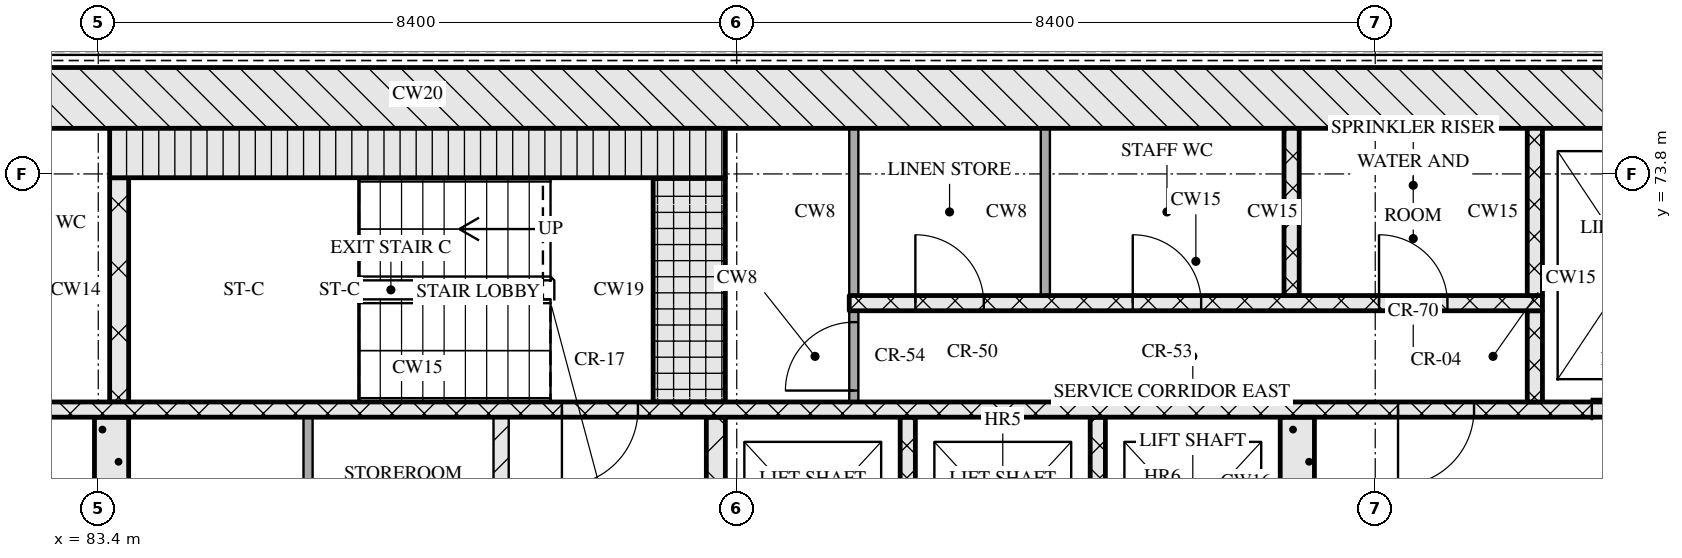
"""IFC4 building model, lengths in metres.
Left out: names, types, materials, properties, quantities, classifications, styles, units other than length and angle.
Written with IfcOpenShell. Run it as: python <this file> out.ifc"""

import sys

from ifc_helpers import new_model, si_unit, direction, frame, frame_2d, origin, place, context, subcontext, project, spatial, rectangle, extrude, element, fill, save


model = new_model("IFC4")
c1 = context("Model", 3, precision=1e-05, world=origin(), true_north=direction((0.0, 1.0)))
c2 = subcontext(c1, "Body", "Model", "MODEL_VIEW")
j1 = project(units=[si_unit("LENGTHUNIT", "METRE"), si_unit("PLANEANGLEUNIT", "RADIAN")], contexts=[c1])
p1 = place(None, origin())
s1 = spatial("IfcSite", under=j1, at=p1, CompositionType="ELEMENT")
p2 = place(p1, origin())
s2 = spatial("IfcBuilding", under=s1, at=p2, CompositionType="ELEMENT")
p3 = place(p2, frame((0.0, 0.0, 154.65)))
s3 = spatial("IfcBuildingStorey", under=s2, at=p3, CompositionType="ELEMENT", Elevation=154.65)
p4 = place(p3, frame((67.0, 74.8, 0.0), z_axis=(0.0, 0.0, 1.0), x_axis=(1.0, 0.0, 0.0)))
e1 = element("IfcWall", 1, at=p4, inside=s3, PredefinedType="SOLIDWALL", context=c2, shape_type="SweptSolid", body=[
    extrude(rectangle(XDim=41.2, YDim=0.8, at=frame_2d((20.6, 0.0))), origin(), (0.0, 0.0, 1.0), 3.32),
])
p5 = place(p3, frame((83.575, 68.0, 0.0), z_axis=(0.0, 0.0, 1.0), x_axis=(0.0, 1.0, 0.0)))
e2 = element("IfcWall", 2, at=p5, inside=s3, PredefinedType="SOLIDWALL", context=c2, shape_type="SweptSolid", body=[
    extrude(rectangle(XDim=2.6, YDim=0.45, at=frame_2d((1.3, 0.0))), origin(), (0.0, 0.0, 1.0), 3.32),
])
p6 = place(p3, frame((86.16, 68.0, 0.0), z_axis=(0.0, 0.0, 1.0), x_axis=(0.0, 1.0, 0.0)))
e3 = element("IfcWall", 3, at=p6, inside=s3, PredefinedType="PARTITIONING", context=c2, shape_type="SweptSolid", body=[
    extrude(rectangle(XDim=2.6, YDim=0.12, at=frame_2d((1.3, 0.0))), origin(), (0.0, 0.0, 1.0), 3.32),
])
p7 = place(p3, frame((88.7, 68.0, 0.0), z_axis=(0.0, 0.0, 1.0), x_axis=(0.0, 1.0, 0.0)))
e4 = element("IfcWall", 4, at=p7, inside=s3, PredefinedType="PARTITIONING", context=c2, shape_type="SweptSolid", body=[
    extrude(rectangle(XDim=2.6, YDim=0.2, at=frame_2d((1.3, 0.0))), origin(), (0.0, 0.0, 1.0), 3.32),
])
p8 = place(p3, frame((91.525, 68.0, 0.0), z_axis=(0.0, 0.0, 1.0), x_axis=(0.0, 1.0, 0.0)))
e5 = element("IfcWall", 5, at=p8, inside=s3, PredefinedType="SOLIDWALL", context=c2, shape_type="SweptSolid", body=[
    extrude(rectangle(XDim=2.6, YDim=0.25, at=frame_2d((1.3, 0.0))), origin(), (0.0, 0.0, 1.0), 3.32),
])
for number, where, z_axis, x_axis in (
    (6, (94.05, 68.0, 0.0), (0.0, 0.0, 1.0), (0.0, 1.0, 0.0)),
    (7, (96.55, 68.0, 0.0), (0.0, 0.0, 1.0), (0.0, 1.0, 0.0)),
):
    element("IfcWall", number, at=place(p3, frame(where, z_axis=z_axis, x_axis=x_axis)), inside=s3, PredefinedType="SOLIDWALL", context=c2, shape_type="SweptSolid", body=[
        extrude(rectangle(XDim=2.6, YDim=0.2, at=frame_2d((1.3, 0.0))), origin(), (0.0, 0.0, 1.0), 3.32),
    ])
p9 = place(p3, frame((99.175, 68.3, 0.0), z_axis=(0.0, 0.0, 1.0), x_axis=(0.0, 1.0, 0.0)))
e8 = element("IfcWall", 8, at=p9, inside=s3, PredefinedType="SOLIDWALL", context=c2, shape_type="SweptSolid", body=[
    extrude(rectangle(XDim=2.3, YDim=0.45, at=frame_2d((1.15, 0.0))), origin(), (0.0, 0.0, 1.0), 3.32),
])
p10 = place(p3, frame((67.8, 70.7, 0.0), z_axis=(0.0, 0.0, 1.0), x_axis=(1.0, 0.0, 0.0)))
e9 = element("IfcWall", 9, at=p10, inside=s3, PredefinedType="SOLIDWALL", context=c2, shape_type="SweptSolid", body=[
    extrude(rectangle(XDim=39.6, YDim=0.2, at=frame_2d((19.8, 0.0))), origin(), (0.0, 0.0, 1.0), 3.32),
])
p11 = place(p10, frame((0.65, 0.0, 0.0)))
e10 = element("IfcOpeningElement", 10, at=p11, cuts=e9, PredefinedType="OPENING", context=c2, shape_type="SweptSolid", body=[
    extrude(rectangle(XDim=1.1, YDim=2.1, at=frame_2d((0.55, 1.05))), frame((0.0, 0.11, 0.0), z_axis=(0.0, -1.0, 0.0), x_axis=(1.0, 0.0, 0.0)), (0.0, 0.0, 1.0), 0.22),
])
p12 = place(p10, frame((3.25, 0.0, 0.0)))
e11 = element("IfcOpeningElement", 11, at=p12, cuts=e9, PredefinedType="OPENING", context=c2, shape_type="SweptSolid", body=[
    extrude(rectangle(XDim=1.1, YDim=2.1, at=frame_2d((0.55, 1.05))), frame((0.0, 0.11, 0.0), z_axis=(0.0, -1.0, 0.0), x_axis=(1.0, 0.0, 0.0)), (0.0, 0.0, 1.0), 0.22),
])
p13 = place(p10, frame((5.9, 0.0, 0.0)))
e12 = element("IfcOpeningElement", 12, at=p13, cuts=e9, PredefinedType="OPENING", context=c2, shape_type="SweptSolid", body=[
    extrude(rectangle(XDim=1.0, YDim=2.1, at=frame_2d((0.5, 1.05))), frame((0.0, 0.11, 0.0), z_axis=(0.0, -1.0, 0.0), x_axis=(1.0, 0.0, 0.0)), (0.0, 0.0, 1.0), 0.22),
])
p14 = place(p10, frame((21.7, 0.0, 0.0)))
e13 = element("IfcOpeningElement", 13, at=p14, cuts=e9, PredefinedType="OPENING", context=c2, shape_type="SweptSolid", body=[
    extrude(rectangle(XDim=1.0, YDim=2.1, at=frame_2d((0.5, 1.05))), frame((0.0, 0.11, 0.0), z_axis=(0.0, -1.0, 0.0), x_axis=(1.0, 0.0, 0.0)), (0.0, 0.0, 1.0), 0.22),
])
p15 = place(p10, frame((32.7, 0.0, 0.0)))
e14 = element("IfcOpeningElement", 14, at=p15, cuts=e9, PredefinedType="OPENING", context=c2, shape_type="SweptSolid", body=[
    extrude(rectangle(XDim=1.0, YDim=2.1, at=frame_2d((0.5, 1.05))), frame((0.0, 0.11, 0.0), z_axis=(0.0, -1.0, 0.0), x_axis=(1.0, 0.0, 0.0)), (0.0, 0.0, 1.0), 0.22),
])
p16 = place(p10, frame((35.25, 0.0, 0.0)))
e15 = element("IfcOpeningElement", 15, at=p16, cuts=e9, PredefinedType="OPENING", context=c2, shape_type="SweptSolid", body=[
    extrude(rectangle(XDim=1.1, YDim=2.1, at=frame_2d((0.55, 1.05))), frame((0.0, 0.11, 0.0), z_axis=(0.0, -1.0, 0.0), x_axis=(1.0, 0.0, 0.0)), (0.0, 0.0, 1.0), 0.22),
])
p17 = place(p10, frame((37.85, 0.0, 0.0)))
e16 = element("IfcOpeningElement", 16, at=p17, cuts=e9, PredefinedType="OPENING", context=c2, shape_type="SweptSolid", body=[
    extrude(rectangle(XDim=1.1, YDim=2.1, at=frame_2d((0.55, 1.05))), frame((0.0, 0.11, 0.0), z_axis=(0.0, -1.0, 0.0), x_axis=(1.0, 0.0, 0.0)), (0.0, 0.0, 1.0), 0.22),
])
p18 = place(p3, frame((83.675, 70.8, 0.0), z_axis=(0.0, 0.0, 1.0), x_axis=(0.0, 1.0, 0.0)))
e17 = element("IfcWall", 17, at=p18, inside=s3, PredefinedType="SOLIDWALL", context=c2, shape_type="SweptSolid", body=[
    extrude(rectangle(XDim=2.95, YDim=0.25, at=frame_2d((1.475, 0.0))), origin(), (0.0, 0.0, 1.0), 3.32),
])
p19 = place(p3, frame((91.175, 70.8, 0.0), z_axis=(0.0, 0.0, 1.0), x_axis=(0.0, 1.0, 0.0)))
e18 = element("IfcWall", 18, at=p19, inside=s3, PredefinedType="SOLIDWALL", context=c2, shape_type="SweptSolid", body=[
    extrude(rectangle(XDim=2.95, YDim=0.95, at=frame_2d((1.475, 0.0))), origin(), (0.0, 0.0, 1.0), 3.32),
])
p20 = place(p3, frame((93.34, 70.8, 0.0), z_axis=(0.0, 0.0, 1.0), x_axis=(0.0, 1.0, 0.0)))
e19 = element("IfcWall", 19, at=p20, inside=s3, PredefinedType="PARTITIONING", context=c2, shape_type="SweptSolid", body=[
    extrude(rectangle(XDim=1.2, YDim=0.12, at=frame_2d((0.6, 0.0))), origin(), (0.0, 0.0, 1.0), 3.32),
])
p21 = place(p20, frame((0.15, 0.0, 0.0)))
e20 = element("IfcOpeningElement", 20, at=p21, cuts=e19, PredefinedType="OPENING", context=c2, shape_type="SweptSolid", body=[
    extrude(rectangle(XDim=0.9, YDim=2.1, at=frame_2d((0.45, 1.05))), frame((0.0, 0.07, 0.0), z_axis=(0.0, -1.0, 0.0), x_axis=(1.0, 0.0, 0.0)), (0.0, 0.0, 1.0), 0.14),
])
p22 = place(p3, frame((102.3, 70.8, 0.0), z_axis=(0.0, 0.0, 1.0), x_axis=(0.0, 1.0, 0.0)))
e21 = element("IfcWall", 21, at=p22, inside=s3, PredefinedType="SOLIDWALL", context=c2, shape_type="SweptSolid", body=[
    extrude(rectangle(XDim=1.2, YDim=0.2, at=frame_2d((0.6, 0.0))), origin(), (0.0, 0.0, 1.0), 3.32),
])
p23 = place(p3, frame((93.28, 72.1, 0.0), z_axis=(0.0, 0.0, 1.0), x_axis=(1.0, 0.0, 0.0)))
e22 = element("IfcWall", 22, at=p23, inside=s3, PredefinedType="SOLIDWALL", context=c2, shape_type="SweptSolid", body=[
    extrude(rectangle(XDim=9.12, YDim=0.2, at=frame_2d((4.56, 0.0))), origin(), (0.0, 0.0, 1.0), 3.32),
])
p24 = place(p23, frame((0.87, 0.0, 0.0)))
e23 = element("IfcOpeningElement", 23, at=p24, cuts=e22, PredefinedType="OPENING", context=c2, shape_type="SweptSolid", body=[
    extrude(rectangle(XDim=0.9, YDim=2.1, at=frame_2d((0.45, 1.05))), frame((0.0, 0.11, 0.0), z_axis=(0.0, -1.0, 0.0), x_axis=(1.0, 0.0, 0.0)), (0.0, 0.0, 1.0), 0.22),
])
p25 = place(p23, frame((3.73, 0.0, 0.0)))
e24 = element("IfcOpeningElement", 24, at=p25, cuts=e22, PredefinedType="OPENING", context=c2, shape_type="SweptSolid", body=[
    extrude(rectangle(XDim=0.9, YDim=2.1, at=frame_2d((0.45, 1.05))), frame((0.0, 0.11, 0.0), z_axis=(0.0, -1.0, 0.0), x_axis=(1.0, 0.0, 0.0)), (0.0, 0.0, 1.0), 0.22),
])
p26 = place(p23, frame((6.97, 0.0, 0.0)))
e25 = element("IfcOpeningElement", 25, at=p26, cuts=e22, PredefinedType="OPENING", context=c2, shape_type="SweptSolid", body=[
    extrude(rectangle(XDim=0.9, YDim=2.1, at=frame_2d((0.45, 1.05))), frame((0.0, 0.11, 0.0), z_axis=(0.0, -1.0, 0.0), x_axis=(1.0, 0.0, 0.0)), (0.0, 0.0, 1.0), 0.22),
])
for number, where, z_axis, x_axis in (
    (26, (93.34, 72.2, 0.0), (0.0, 0.0, 1.0), (0.0, 1.0, 0.0)),
    (27, (95.86, 72.2, 0.0), (0.0, 0.0, 1.0), (0.0, 1.0, 0.0)),
):
    element("IfcWall", number, at=place(p3, frame(where, z_axis=z_axis, x_axis=x_axis)), inside=s3, PredefinedType="PARTITIONING", context=c2, shape_type="SweptSolid", body=[
        extrude(rectangle(XDim=2.2, YDim=0.12, at=frame_2d((1.1, 0.0))), origin(), (0.0, 0.0, 1.0), 3.32),
    ])
for number, where, z_axis, x_axis in (
    (28, (99.1, 72.2, 0.0), (0.0, 0.0, 1.0), (0.0, 1.0, 0.0)),
    (29, (102.3, 72.2, 0.0), (0.0, 0.0, 1.0), (0.0, 1.0, 0.0)),
):
    element("IfcWall", number, at=place(p3, frame(where, z_axis=z_axis, x_axis=x_axis)), inside=s3, PredefinedType="SOLIDWALL", context=c2, shape_type="SweptSolid", body=[
        extrude(rectangle(XDim=2.2, YDim=0.2, at=frame_2d((1.1, 0.0))), origin(), (0.0, 0.0, 1.0), 3.32),
    ])
p27 = place(p3, frame((83.55, 74.075, 0.0), z_axis=(0.0, 0.0, 1.0), x_axis=(1.0, 0.0, 0.0)))
e30 = element("IfcWall", 30, at=p27, inside=s3, PredefinedType="SOLIDWALL", context=c2, shape_type="SweptSolid", body=[
    extrude(rectangle(XDim=8.1, YDim=0.65, at=frame_2d((4.05, 0.0))), origin(), (0.0, 0.0, 1.0), 3.32),
])
p28 = place(p14, origin())
e31 = element("IfcDoor", 31, at=p28, inside=s3, OperationType="SINGLE_SWING_RIGHT", PredefinedType="DOOR", context=c2, shape_type="SweptSolid", body=[
    extrude(rectangle(XDim=1.0, YDim=2.1, at=frame_2d((0.5, 1.05))), frame((0.0, 0.025, 0.0), z_axis=(0.0, -1.0, 0.0), x_axis=(1.0, 0.0, 0.0)), (0.0, 0.0, 1.0), 0.05),
])
fill(e13, e31)
p29 = place(p15, origin())
e32 = element("IfcDoor", 32, at=p29, inside=s3, OperationType="SINGLE_SWING_RIGHT", PredefinedType="DOOR", context=c2, shape_type="SweptSolid", body=[
    extrude(rectangle(XDim=1.0, YDim=2.1, at=frame_2d((0.5, 1.05))), frame((0.0, 0.025, 0.0), z_axis=(0.0, -1.0, 0.0), x_axis=(1.0, 0.0, 0.0)), (0.0, 0.0, 1.0), 0.05),
])
fill(e14, e32)
p30 = place(p16, origin())
e33 = element("IfcDoor", 33, at=p30, inside=s3, OperationType="SLIDING_TO_RIGHT", PredefinedType="DOOR", context=c2, shape_type="SweptSolid", body=[
    extrude(rectangle(XDim=1.1, YDim=2.1, at=frame_2d((0.55, 1.05))), frame((0.0, 0.025, 0.0), z_axis=(0.0, -1.0, 0.0), x_axis=(1.0, 0.0, 0.0)), (0.0, 0.0, 1.0), 0.05),
])
fill(e15, e33)
p31 = place(p21, origin())
e34 = element("IfcDoor", 34, at=p31, inside=s3, OperationType="SINGLE_SWING_LEFT", PredefinedType="DOOR", context=c2, shape_type="SweptSolid", body=[
    extrude(rectangle(XDim=0.9, YDim=2.1, at=frame_2d((0.45, 1.05))), frame((0.0, 0.025, 0.0), z_axis=(0.0, -1.0, 0.0), x_axis=(1.0, 0.0, 0.0)), (0.0, 0.0, 1.0), 0.05),
])
fill(e20, e34)
p32 = place(p24, origin())
e35 = element("IfcDoor", 35, at=p32, inside=s3, OperationType="SINGLE_SWING_LEFT", PredefinedType="DOOR", context=c2, shape_type="SweptSolid", body=[
    extrude(rectangle(XDim=0.9, YDim=2.1, at=frame_2d((0.45, 1.05))), frame((0.0, 0.025, 0.0), z_axis=(0.0, -1.0, 0.0), x_axis=(1.0, 0.0, 0.0)), (0.0, 0.0, 1.0), 0.05),
])
fill(e23, e35)
p33 = place(p25, origin())
e36 = element("IfcDoor", 36, at=p33, inside=s3, OperationType="SINGLE_SWING_LEFT", PredefinedType="DOOR", context=c2, shape_type="SweptSolid", body=[
    extrude(rectangle(XDim=0.9, YDim=2.1, at=frame_2d((0.45, 1.05))), frame((0.0, 0.025, 0.0), z_axis=(0.0, -1.0, 0.0), x_axis=(1.0, 0.0, 0.0)), (0.0, 0.0, 1.0), 0.05),
])
fill(e24, e36)
p34 = place(p26, origin())
e37 = element("IfcDoor", 37, at=p34, inside=s3, OperationType="SINGLE_SWING_LEFT", PredefinedType="DOOR", context=c2, shape_type="SweptSolid", body=[
    extrude(rectangle(XDim=0.9, YDim=2.1, at=frame_2d((0.45, 1.05))), frame((0.0, 0.025, 0.0), z_axis=(0.0, -1.0, 0.0), x_axis=(1.0, 0.0, 0.0)), (0.0, 0.0, 1.0), 0.05),
])
fill(e25, e37)
save(model, sys.argv[1])
